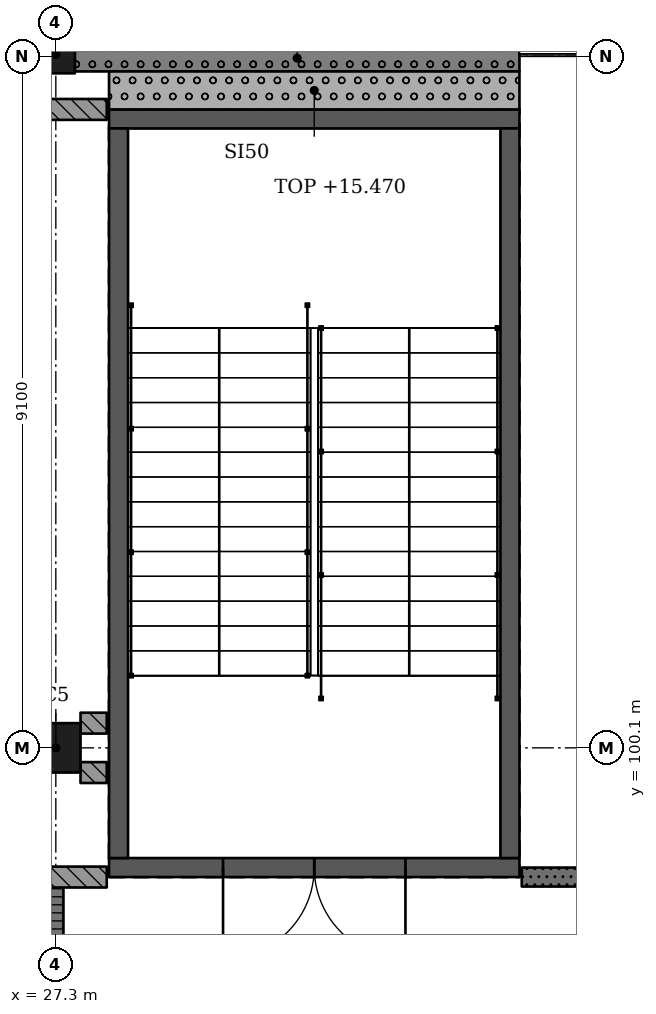
"""IFC4 building model, lengths in metres.
Left out: names, types, materials, properties, quantities, classifications, styles, units other than length and angle.
Written with IfcOpenShell. Run it as: python <this file> out.ifc"""

import sys

from ifc_helpers import new_model, si_unit, direction, frame, frame_2d, origin, origin_2d, place, context, subcontext, project, spatial, rectangle, extrude, element, fill, save


model = new_model("IFC4")
c1 = context("Model", 3, precision=1e-05, world=origin(), true_north=direction((0.0, 1.0)))
c2 = subcontext(c1, "Body", "Model", "MODEL_VIEW")
j1 = project(units=[si_unit("LENGTHUNIT", "METRE"), si_unit("PLANEANGLEUNIT", "RADIAN")], contexts=[c1])
p1 = place(None, origin())
s1 = spatial("IfcSite", under=j1, at=p1, CompositionType="ELEMENT")
p2 = place(p1, origin())
s2 = spatial("IfcBuilding", under=s1, at=p2, CompositionType="ELEMENT")
p3 = place(p2, frame((0.0, 0.0, 10.92)))
s3 = spatial("IfcBuildingStorey", under=s2, at=p3, CompositionType="ELEMENT", Elevation=10.92)
p4 = place(p3, frame((27.3, 100.1, 0.0), z_axis=(0.0, 0.0, 1.0), x_axis=(1.0, 0.0, 0.0)))
e1 = element("IfcColumn", 1, at=p4, inside=s3, PredefinedType="COLUMN", context=c2, shape_type="SweptSolid", body=[
    extrude(rectangle(XDim=0.65, YDim=0.65, at=origin_2d()), origin(), (0.0, 0.0, 1.0), 4.55),
])
p5 = place(p3, frame((27.3, 109.225, 0.0), z_axis=(0.0, 0.0, 1.0), x_axis=(1.0, 0.0, 0.0)))
e2 = element("IfcColumn", 2, at=p5, inside=s3, PredefinedType="COLUMN", context=c2, shape_type="SweptSolid", body=[
    extrude(rectangle(XDim=0.5, YDim=0.5, at=origin_2d()), origin(), (0.0, 0.0, 1.0), 4.55),
])
p6 = place(p3, frame((33.4, 98.525, 0.0), z_axis=(0.0, 0.0, 1.0), x_axis=(-1.0, 0.0, 0.0)))
e3 = element("IfcWall", 3, at=p6, inside=s3, PredefinedType="SHEAR", context=c2, shape_type="SweptSolid", body=[
    extrude(rectangle(XDim=5.4, YDim=0.25, at=frame_2d((2.7, 0.0))), origin(), (0.0, 0.0, 1.0), 4.55),
])
p7 = place(p6, frame((1.5, 0.0, 0.0)))
e4 = element("IfcOpeningElement", 4, at=p7, cuts=e3, PredefinedType="OPENING", context=c2, shape_type="SweptSolid", body=[
    extrude(rectangle(XDim=2.4, YDim=2.1, at=frame_2d((1.2, 1.05))), frame((0.0, 0.135, 0.0), z_axis=(0.0, -1.0, 0.0), x_axis=(1.0, 0.0, 0.0)), (0.0, 0.0, 1.0), 0.27),
])
p8 = place(p3, frame((33.4, 108.375, 0.0), z_axis=(0.0, 0.0, 1.0), x_axis=(-1.0, 0.0, 0.0)))
e5 = element("IfcWall", 5, at=p8, inside=s3, PredefinedType="SHEAR", context=c2, shape_type="SweptSolid", body=[
    extrude(rectangle(XDim=5.4, YDim=0.25, at=frame_2d((2.7, 0.0))), origin(), (0.0, 0.0, 1.0), 4.55),
])
for number, where, z_axis, x_axis in (
    (6, (28.125, 108.25, 0.0), (0.0, 0.0, 1.0), (0.0, -1.0, 0.0)),
    (7, (33.275, 108.25, 0.0), (0.0, 0.0, 1.0), (0.0, -1.0, 0.0)),
):
    element("IfcWall", number, at=place(p3, frame(where, z_axis=z_axis, x_axis=x_axis)), inside=s3, PredefinedType="SHEAR", context=c2, shape_type="SweptSolid", body=[
        extrude(rectangle(XDim=9.6, YDim=0.25, at=frame_2d((4.8, 0.0))), origin(), (0.0, 0.0, 1.0), 4.55),
    ])
p9 = place(p3, frame((33.4, 109.175, 0.0), z_axis=(0.0, 0.0, 1.0), x_axis=(-1.0, 0.0, 0.0)))
e8 = element("IfcWall", 8, at=p9, inside=s3, PredefinedType="SOLIDWALL", context=c2, shape_type="SweptSolid", body=[
    extrude(rectangle(XDim=5.85, YDim=0.35, at=frame_2d((2.925, 0.0))), origin(), (0.0, 0.0, 1.0), 3.5),
])
p10 = place(p3, frame((28.0, 108.75, 0.0), z_axis=(0.0, 0.0, 1.0), x_axis=(1.0, 0.0, 0.0)))
e9 = element("IfcWall", 9, at=p10, inside=s3, PredefinedType="SOLIDWALL", context=c2, shape_type="SweptSolid", body=[
    extrude(rectangle(XDim=5.4, YDim=0.5, at=frame_2d((2.7, 0.0))), origin(), (0.0, 0.0, 1.0), 4.55),
])
p11 = place(p3, frame((24.33, 98.4, 0.0), z_axis=(0.0, 0.0, 1.0), x_axis=(1.0, 0.0, 0.0)))
e10 = element("IfcWall", 10, at=p11, inside=s3, PredefinedType="SOLIDWALL", context=c2, shape_type="SweptSolid", body=[
    extrude(rectangle(XDim=3.64, YDim=0.275, at=frame_2d((1.82, 0.0))), origin(), (0.0, 0.0, 1.0), 4.25),
])
p12 = place(p11, frame((0.85, 0.0, 0.0)))
e11 = element("IfcOpeningElement", 11, at=p12, cuts=e10, PredefinedType="OPENING", context=c2, shape_type="SweptSolid", body=[
    extrude(rectangle(XDim=1.2, YDim=2.4, at=frame_2d((0.6, 1.2))), frame((0.0, 0.147, 0.0), z_axis=(0.0, -1.0, 0.0), x_axis=(1.0, 0.0, 0.0)), (0.0, 0.0, 1.0), 0.295),
])
p13 = place(p3, frame((24.33, 108.5, 0.0), z_axis=(0.0, 0.0, 1.0), x_axis=(1.0, 0.0, 0.0)))
e12 = element("IfcWall", 12, at=p13, inside=s3, PredefinedType="SOLIDWALL", context=c2, shape_type="SweptSolid", body=[
    extrude(rectangle(XDim=3.64, YDim=0.275, at=frame_2d((1.82, 0.0))), origin(), (0.0, 0.0, 1.0), 4.25),
])
p14 = place(p3, frame((27.3, 98.262, 0.0), z_axis=(0.0, 0.0, 1.0), x_axis=(0.0, -1.0, 0.0)))
e13 = element("IfcWall", 13, at=p14, inside=s3, PredefinedType="PARTITIONING", context=c2, shape_type="SweptSolid", body=[
    extrude(rectangle(XDim=6.863, YDim=0.2, at=frame_2d((3.431, 0.0))), origin(), (0.0, 0.0, 1.0), 3.55),
])
p15 = place(p14, frame((0.85, 0.0, 0.0)))
e14 = element("IfcOpeningElement", 14, at=p15, cuts=e13, PredefinedType="OPENING", context=c2, shape_type="SweptSolid", body=[
    extrude(rectangle(XDim=1.8, YDim=2.4, at=frame_2d((0.9, 1.2))), frame((0.0, 0.11, 0.0), z_axis=(0.0, -1.0, 0.0), x_axis=(1.0, 0.0, 0.0)), (0.0, 0.0, 1.0), 0.22),
])
p16 = place(p14, frame((4.25, 0.0, 0.0)))
e15 = element("IfcOpeningElement", 15, at=p16, cuts=e13, PredefinedType="OPENING", context=c2, shape_type="SweptSolid", body=[
    extrude(rectangle(XDim=1.8, YDim=2.4, at=frame_2d((0.9, 1.2))), frame((0.0, 0.11, 0.0), z_axis=(0.0, -1.0, 0.0), x_axis=(1.0, 0.0, 0.0)), (0.0, 0.0, 1.0), 0.22),
])
for number, where, z_axis, x_axis in (
    (16, (27.625, 99.775, 0.0), (0.0, 0.0, 1.0), (1.0, 0.0, 0.0)),
    (17, (27.97, 100.425, 0.0), (0.0, 0.0, 1.0), (-1.0, 0.0, 0.0)),
):
    element("IfcWall", number, at=place(p3, frame(where, z_axis=z_axis, x_axis=x_axis)), inside=s3, PredefinedType="SOLIDWALL", context=c2, shape_type="SweptSolid", body=[
        extrude(rectangle(XDim=0.345, YDim=0.275, at=frame_2d((0.172, 0.0))), origin(), (0.0, 0.0, 1.0), 4.25),
    ])
p17 = place(p3, frame((33.43, 98.4, 0.0), z_axis=(0.0, 0.0, 1.0), x_axis=(1.0, 0.0, 0.0)))
e18 = element("IfcWall", 18, at=p17, inside=s3, PredefinedType="SOLIDWALL", context=c2, shape_type="SweptSolid", body=[
    extrude(rectangle(XDim=2.72, YDim=0.25, at=frame_2d((1.36, 0.0))), origin(), (0.0, 0.0, 1.0), 4.25),
])
p18 = place(p7, origin())
e19 = element("IfcDoor", 19, at=p18, inside=s3, OperationType="DOUBLE_DOOR_SINGLE_SWING", PredefinedType="DOOR", context=c2, shape_type="SweptSolid", body=[
    extrude(rectangle(XDim=2.4, YDim=2.1, at=frame_2d((1.2, 1.05))), frame((0.0, 0.025, 0.0), z_axis=(0.0, -1.0, 0.0), x_axis=(1.0, 0.0, 0.0)), (0.0, 0.0, 1.0), 0.05),
])
fill(e4, e19)
save(model, sys.argv[1])
